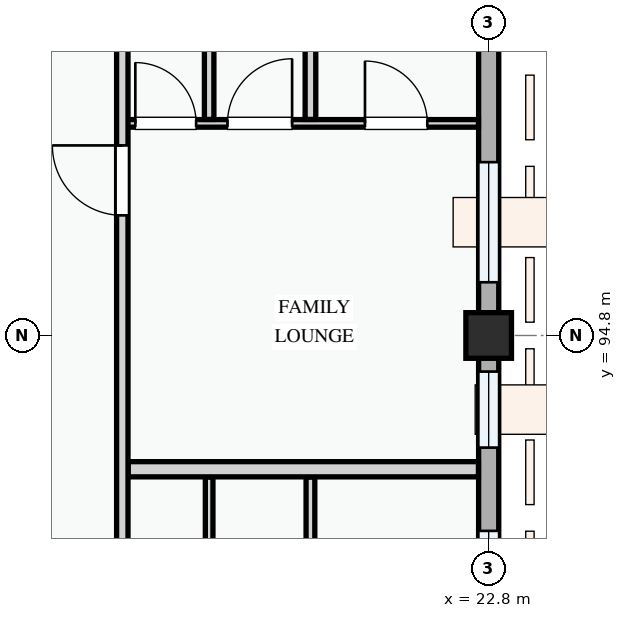
"""IFC4 building model, lengths in metres.
Left out: names, types, materials, properties, quantities, classifications, styles, units other than length and angle.
Written with IfcOpenShell. Run it as: python <this file> out.ifc"""

import sys

from ifc_helpers import new_model, si_unit, direction, frame, frame_2d, origin, origin_2d, place, context, subcontext, project, spatial, rectangle, extrude, element, fill, save


model = new_model("IFC4")
c1 = context("Model", 3, precision=1e-05, world=origin(), true_north=direction((0.0, 1.0)))
c2 = subcontext(c1, "Body", "Model", "MODEL_VIEW")
j1 = project(units=[si_unit("LENGTHUNIT", "METRE"), si_unit("PLANEANGLEUNIT", "RADIAN")], contexts=[c1])
p1 = place(None, origin())
s1 = spatial("IfcSite", under=j1, at=p1, CompositionType="ELEMENT")
p2 = place(p1, origin())
s2 = spatial("IfcBuilding", under=s1, at=p2, CompositionType="ELEMENT")
p3 = place(p2, frame((0.0, 0.0, 34.5)))
s3 = spatial("IfcBuildingStorey", under=s2, at=p3, CompositionType="ELEMENT", Elevation=34.5)
p4 = place(p3, frame((22.8, 94.8, 0.0), z_axis=(0.0, 0.0, 1.0), x_axis=(1.0, 0.0, 0.0)))
e1 = element("IfcColumn", 1, at=p4, inside=s3, PredefinedType="COLUMN", context=c2, shape_type="SweptSolid", body=[
    extrude(rectangle(XDim=0.6, YDim=0.6, at=origin_2d()), origin(), (0.0, 0.0, 1.0), 3.3),
])
p5 = place(p3, frame((22.8, 86.4, 0.0), z_axis=(0.0, 0.0, 1.0), x_axis=(0.0, 1.0, 0.0)))
e2 = element("IfcWall", 2, at=p5, inside=s3, PredefinedType="STANDARD", context=c2, shape_type="SweptSolid", body=[
    extrude(rectangle(XDim=8.4, YDim=0.265, at=frame_2d((4.2, 0.0))), origin(), (0.0, 0.0, 1.0), 2.425),
])
p6 = place(p5, frame((0.914, 0.0, 0.78)))
e3 = element("IfcOpeningElement", 3, at=p6, cuts=e2, PredefinedType="OPENING", context=c2, shape_type="SweptSolid", body=[
    extrude(rectangle(XDim=1.58, YDim=1.48, at=frame_2d((0.79, 0.74))), frame((0.0, 0.143, 0.0), z_axis=(0.0, -1.0, 0.0), x_axis=(1.0, 0.0, 0.0)), (0.0, 0.0, 1.0), 0.285),
])
p7 = place(p5, frame((4.029, 0.0, 0.78)))
e4 = element("IfcOpeningElement", 4, at=p7, cuts=e2, PredefinedType="OPENING", context=c2, shape_type="SweptSolid", body=[
    extrude(rectangle(XDim=1.8, YDim=1.5, at=frame_2d((0.9, 0.75))), frame((0.0, 0.143, 0.0), z_axis=(0.0, -1.0, 0.0), x_axis=(1.0, 0.0, 0.0)), (0.0, 0.0, 1.0), 0.285),
])
p8 = place(p5, frame((6.925, 0.0, 0.78)))
e5 = element("IfcOpeningElement", 5, at=p8, cuts=e2, PredefinedType="OPENING", context=c2, shape_type="SweptSolid", body=[
    extrude(rectangle(XDim=1.0, YDim=1.25, at=frame_2d((0.5, 0.625))), frame((0.0, 0.143, 0.0), z_axis=(0.0, -1.0, 0.0), x_axis=(1.0, 0.0, 0.0)), (0.0, 0.0, 1.0), 0.285),
])
p9 = place(p3, frame((22.8, 94.8, 0.0), z_axis=(0.0, 0.0, 1.0), x_axis=(0.0, 1.0, 0.0)))
e6 = element("IfcWall", 6, at=p9, inside=s3, PredefinedType="STANDARD", context=c2, shape_type="SweptSolid", body=[
    extrude(rectangle(XDim=6.0, YDim=0.265, at=frame_2d((3.0, 0.0))), origin(), (0.0, 0.0, 1.0), 2.575),
])
p10 = place(p9, frame((0.7, 0.0, 0.78)))
e7 = element("IfcOpeningElement", 7, at=p10, cuts=e6, PredefinedType="OPENING", context=c2, shape_type="SweptSolid", body=[
    extrude(rectangle(XDim=1.58, YDim=1.48, at=frame_2d((0.79, 0.74))), frame((0.0, 0.143, 0.0), z_axis=(0.0, -1.0, 0.0), x_axis=(1.0, 0.0, 0.0)), (0.0, 0.0, 1.0), 0.285),
])
p11 = place(p9, frame((3.75, 0.0, 0.78)))
e8 = element("IfcOpeningElement", 8, at=p11, cuts=e6, PredefinedType="OPENING", context=c2, shape_type="SweptSolid", body=[
    extrude(rectangle(XDim=1.1, YDim=1.3, at=frame_2d((0.55, 0.65))), frame((0.0, 0.143, 0.0), z_axis=(0.0, -1.0, 0.0), x_axis=(1.0, 0.0, 0.0)), (0.0, 0.0, 1.0), 0.285),
])
p12 = place(p3, frame((20.455, 89.683, 0.0), z_axis=(0.0, 0.0, 1.0), x_axis=(0.0, 1.0, 0.0)))
e9 = element("IfcWall", 9, at=p12, inside=s3, PredefinedType="PARTITIONING", context=c2, shape_type="SweptSolid", body=[
    extrude(rectangle(XDim=3.255, YDim=0.115, at=frame_2d((1.627, 0.0))), origin(), (0.0, 0.0, 1.0), 3.0),
])
p13 = place(p3, frame((19.122, 89.683, 0.0), z_axis=(0.0, 0.0, 1.0), x_axis=(0.0, 1.0, 0.0)))
e10 = element("IfcWall", 10, at=p13, inside=s3, PredefinedType="PARTITIONING", context=c2, shape_type="SweptSolid", body=[
    extrude(rectangle(XDim=3.255, YDim=0.1, at=frame_2d((1.627, 0.0))), origin(), (0.0, 0.0, 1.0), 3.0),
])
p14 = place(p3, frame((17.98, 97.59, 0.0), z_axis=(0.0, 0.0, 1.0), x_axis=(1.0, 0.0, 0.0)))
e11 = element("IfcWall", 11, at=p14, inside=s3, PredefinedType="PARTITIONING", context=c2, shape_type="SweptSolid", body=[
    extrude(rectangle(XDim=4.686, YDim=0.1, at=frame_2d((2.343, 0.0))), origin(), (0.0, 0.0, 1.0), 3.0),
])
p15 = place(p14, frame((0.171, 0.0, 0.0)))
e12 = element("IfcOpeningElement", 12, at=p15, cuts=e11, PredefinedType="OPENING", context=c2, shape_type="SweptSolid", body=[
    extrude(rectangle(XDim=0.8, YDim=2.1, at=frame_2d((0.4, 1.05))), frame((0.0, 0.06, 0.0), z_axis=(0.0, -1.0, 0.0), x_axis=(1.0, 0.0, 0.0)), (0.0, 0.0, 1.0), 0.12),
])
p16 = place(p14, frame((1.384, 0.0, 0.0)))
e13 = element("IfcOpeningElement", 13, at=p16, cuts=e11, PredefinedType="OPENING", context=c2, shape_type="SweptSolid", body=[
    extrude(rectangle(XDim=0.85, YDim=2.1, at=frame_2d((0.425, 1.05))), frame((0.0, 0.06, 0.0), z_axis=(0.0, -1.0, 0.0), x_axis=(1.0, 0.0, 0.0)), (0.0, 0.0, 1.0), 0.12),
])
p17 = place(p14, frame((3.193, 0.0, 0.0)))
e14 = element("IfcOpeningElement", 14, at=p17, cuts=e11, PredefinedType="OPENING", context=c2, shape_type="SweptSolid", body=[
    extrude(rectangle(XDim=0.82, YDim=2.08, at=frame_2d((0.41, 1.04))), frame((0.0, 0.06, 0.0), z_axis=(0.0, -1.0, 0.0), x_axis=(1.0, 0.0, 0.0)), (0.0, 0.0, 1.0), 0.12),
])
p18 = place(p3, frame((20.455, 97.642, 0.0), z_axis=(0.0, 0.0, 1.0), x_axis=(0.0, 1.0, 0.0)))
e15 = element("IfcWall", 15, at=p18, inside=s3, PredefinedType="PARTITIONING", context=c2, shape_type="SweptSolid", body=[
    extrude(rectangle(XDim=4.783, YDim=0.14, at=frame_2d((2.392, 0.0))), origin(), (0.0, 0.0, 1.0), 3.0),
])
p19 = place(p3, frame((19.122, 97.642, 0.0), z_axis=(0.0, 0.0, 1.0), x_axis=(0.0, 1.0, 0.0)))
e16 = element("IfcWall", 16, at=p19, inside=s3, PredefinedType="PARTITIONING", context=c2, shape_type="SweptSolid", body=[
    extrude(rectangle(XDim=4.783, YDim=0.125, at=frame_2d((2.392, 0.0))), origin(), (0.0, 0.0, 1.0), 3.0),
])
p20 = place(p3, frame((18.057, 93.04, 0.0), z_axis=(0.0, 0.0, 1.0), x_axis=(1.0, 0.0, 0.0)))
e17 = element("IfcWall", 17, at=p20, inside=s3, PredefinedType="PARTITIONING", context=c2, shape_type="SweptSolid", body=[
    extrude(rectangle(XDim=4.609, YDim=0.2, at=frame_2d((2.304, 0.0))), origin(), (0.0, 0.0, 1.0), 3.0),
])
p21 = place(p3, frame((17.98, 86.534, 0.0), z_axis=(0.0, 0.0, 1.0), x_axis=(0.0, 1.0, 0.0)))
e18 = element("IfcWall", 18, at=p21, inside=s3, PredefinedType="PARTITIONING", context=c2, shape_type="SweptSolid", body=[
    extrude(rectangle(XDim=22.806, YDim=0.15, at=frame_2d((11.403, 0.0))), origin(), (0.0, 0.0, 1.0), 3.0),
])
p22 = place(p21, frame((1.874, 0.0, 0.0)))
e19 = element("IfcOpeningElement", 19, at=p22, cuts=e18, PredefinedType="OPENING", context=c2, shape_type="SweptSolid", body=[
    extrude(rectangle(XDim=0.92, YDim=2.1, at=frame_2d((0.46, 1.05))), frame((0.0, 0.085, 0.0), z_axis=(0.0, -1.0, 0.0), x_axis=(1.0, 0.0, 0.0)), (0.0, 0.0, 1.0), 0.17),
])
p23 = place(p21, frame((9.846, 0.0, 0.0)))
e20 = element("IfcOpeningElement", 20, at=p23, cuts=e18, PredefinedType="OPENING", context=c2, shape_type="SweptSolid", body=[
    extrude(rectangle(XDim=0.92, YDim=2.1, at=frame_2d((0.46, 1.05))), frame((0.0, 0.085, 0.0), z_axis=(0.0, -1.0, 0.0), x_axis=(1.0, 0.0, 0.0)), (0.0, 0.0, 1.0), 0.17),
])
p24 = place(p21, frame((17.992, 0.0, 0.0)))
e21 = element("IfcOpeningElement", 21, at=p24, cuts=e18, PredefinedType="OPENING", context=c2, shape_type="SweptSolid", body=[
    extrude(rectangle(XDim=0.96, YDim=2.12, at=frame_2d((0.48, 1.06))), frame((0.0, 0.085, 0.0), z_axis=(0.0, -1.0, 0.0), x_axis=(1.0, 0.0, 0.0)), (0.0, 0.0, 1.0), 0.17),
])
p25 = place(p7, origin())
e22 = element("IfcWindow", 22, at=p25, inside=s3, PartitioningType="DOUBLE_PANEL_VERTICAL", PredefinedType="WINDOW", context=c2, shape_type="SweptSolid", body=[
    extrude(rectangle(XDim=1.8, YDim=1.5, at=frame_2d((0.9, 0.75))), frame((0.0, 0.03, 0.0), z_axis=(0.0, -1.0, 0.0), x_axis=(1.0, 0.0, 0.0)), (0.0, 0.0, 1.0), 0.06),
])
fill(e4, e22)
p26 = place(p8, origin())
e23 = element("IfcWindow", 23, at=p26, inside=s3, PartitioningType="SINGLE_PANEL", PredefinedType="WINDOW", context=c2, shape_type="SweptSolid", body=[
    extrude(rectangle(XDim=1.0, YDim=1.25, at=frame_2d((0.5, 0.625))), frame((0.0, 0.03, 0.0), z_axis=(0.0, -1.0, 0.0), x_axis=(1.0, 0.0, 0.0)), (0.0, 0.0, 1.0), 0.06),
])
fill(e5, e23)
p27 = place(p10, origin())
e24 = element("IfcWindow", 24, at=p27, inside=s3, PartitioningType="SINGLE_PANEL", PredefinedType="WINDOW", context=c2, shape_type="SweptSolid", body=[
    extrude(rectangle(XDim=1.58, YDim=1.48, at=frame_2d((0.79, 0.74))), frame((0.0, 0.03, 0.0), z_axis=(0.0, -1.0, 0.0), x_axis=(1.0, 0.0, 0.0)), (0.0, 0.0, 1.0), 0.06),
])
fill(e7, e24)
p28 = place(p15, origin())
e25 = element("IfcDoor", 25, at=p28, inside=s3, OperationType="SINGLE_SWING_LEFT", PredefinedType="DOOR", context=c2, shape_type="SweptSolid", body=[
    extrude(rectangle(XDim=0.8, YDim=2.1, at=frame_2d((0.4, 1.05))), frame((0.0, 0.025, 0.0), z_axis=(0.0, -1.0, 0.0), x_axis=(1.0, 0.0, 0.0)), (0.0, 0.0, 1.0), 0.05),
])
fill(e12, e25)
p29 = place(p16, origin())
e26 = element("IfcDoor", 26, at=p29, inside=s3, OperationType="SINGLE_SWING_RIGHT", PredefinedType="DOOR", context=c2, shape_type="SweptSolid", body=[
    extrude(rectangle(XDim=0.85, YDim=2.1, at=frame_2d((0.425, 1.05))), frame((0.0, 0.025, 0.0), z_axis=(0.0, -1.0, 0.0), x_axis=(1.0, 0.0, 0.0)), (0.0, 0.0, 1.0), 0.05),
])
fill(e13, e26)
p30 = place(p17, origin())
e27 = element("IfcDoor", 27, at=p30, inside=s3, OperationType="SINGLE_SWING_LEFT", PredefinedType="DOOR", context=c2, shape_type="SweptSolid", body=[
    extrude(rectangle(XDim=0.82, YDim=2.08, at=frame_2d((0.41, 1.04))), frame((0.0, 0.025, 0.0), z_axis=(0.0, -1.0, 0.0), x_axis=(1.0, 0.0, 0.0)), (0.0, 0.0, 1.0), 0.05),
])
fill(e14, e27)
p31 = place(p23, origin())
e28 = element("IfcDoor", 28, at=p31, inside=s3, OperationType="SINGLE_SWING_RIGHT", PredefinedType="DOOR", context=c2, shape_type="SweptSolid", body=[
    extrude(rectangle(XDim=0.92, YDim=2.1, at=frame_2d((0.46, 1.05))), frame((0.0, 0.025, 0.0), z_axis=(0.0, -1.0, 0.0), x_axis=(1.0, 0.0, 0.0)), (0.0, 0.0, 1.0), 0.05),
])
fill(e20, e28)
save(model, sys.argv[1])
